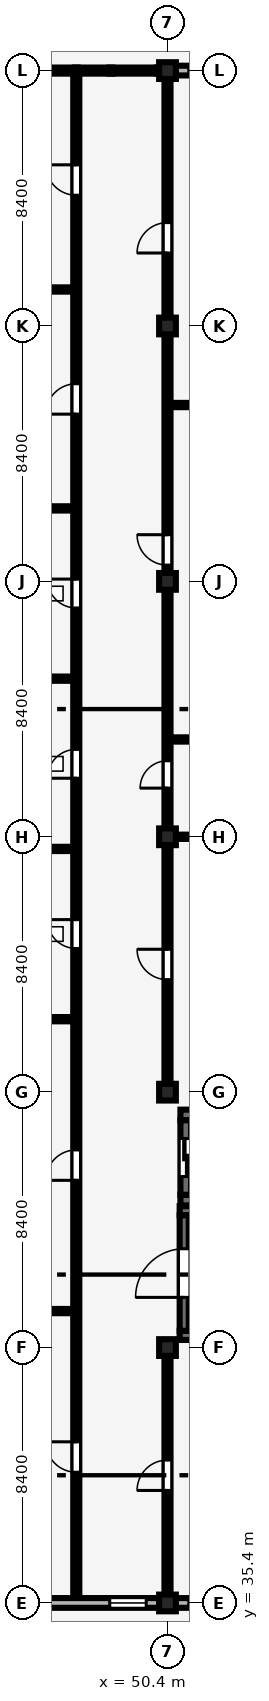
"""IFC4 building model, lengths in metres.
Left out: names, types, materials, properties, quantities, classifications, styles, units other than length and angle.
Written with IfcOpenShell. Run it as: python <this file> out.ifc"""

import sys

from ifc_helpers import new_model, si_unit, direction, frame, frame_2d, origin, origin_2d, place, context, subcontext, project, spatial, rectangle, extrude, element, fill, save


model = new_model("IFC4")
c1 = context("Model", 3, precision=1e-05, world=origin(), true_north=direction((0.0, 1.0)))
c2 = subcontext(c1, "Body", "Model", "MODEL_VIEW")
j1 = project(units=[si_unit("LENGTHUNIT", "METRE"), si_unit("PLANEANGLEUNIT", "RADIAN")], contexts=[c1])
p1 = place(None, origin())
s1 = spatial("IfcSite", under=j1, at=p1, CompositionType="ELEMENT")
p2 = place(p1, origin())
s2 = spatial("IfcBuilding", under=s1, at=p2, CompositionType="ELEMENT")
p3 = place(p2, frame((0.0, 0.0, 9.0)))
s3 = spatial("IfcBuildingStorey", under=s2, at=p3, CompositionType="ELEMENT", Elevation=9.0)
for number, where, z_axis, x_axis in (
    (1, (50.4, 35.4, 0.0), (0.0, 0.0, 1.0), (1.0, 0.0, 0.0)),
    (2, (50.4, 43.8, 0.0), (0.0, 0.0, 1.0), (1.0, 0.0, 0.0)),
    (3, (50.4, 52.2, 0.0), (0.0, 0.0, 1.0), (1.0, 0.0, 0.0)),
    (4, (50.4, 60.6, 0.0), (0.0, 0.0, 1.0), (1.0, 0.0, 0.0)),
    (5, (50.4, 69.0, 0.0), (0.0, 0.0, 1.0), (1.0, 0.0, 0.0)),
    (6, (50.4, 77.4, 0.0), (0.0, 0.0, 1.0), (1.0, 0.0, 0.0)),
    (7, (50.4, 85.8, 0.0), (0.0, 0.0, 1.0), (1.0, 0.0, 0.0)),
):
    element("IfcColumn", number, at=place(p3, frame(where, z_axis=z_axis, x_axis=x_axis)), inside=s3, PredefinedType="COLUMN", context=c2, shape_type="SweptSolid", body=[
        extrude(rectangle(XDim=0.55, YDim=0.55, at=origin_2d()), origin(), (0.0, 0.0, 1.0), 4.2),
    ])
p4 = place(p3, frame((42.25, 35.4, 0.0), z_axis=(0.0, 0.0, 1.0), x_axis=(1.0, 0.0, 0.0)))
e8 = element("IfcWall", 8, at=p4, inside=s3, PredefinedType="SOLIDWALL", context=c2, shape_type="SweptSolid", body=[
    extrude(rectangle(XDim=7.9, YDim=0.32, at=frame_2d((3.95, 0.0))), origin(), (0.0, 0.0, 1.0), 2.96),
])
p5 = place(p4, frame((0.45, 0.0, 0.9)))
e9 = element("IfcOpeningElement", 9, at=p5, cuts=e8, PredefinedType="OPENING", context=c2, shape_type="SweptSolid", body=[
    extrude(rectangle(XDim=1.2, YDim=1.5, at=frame_2d((0.6, 0.75))), frame((0.0, 0.17, 0.0), z_axis=(0.0, -1.0, 0.0), x_axis=(1.0, 0.0, 0.0)), (0.0, 0.0, 1.0), 0.34),
])
p6 = place(p4, frame((6.25, 0.0, 0.9)))
e10 = element("IfcOpeningElement", 10, at=p6, cuts=e8, PredefinedType="OPENING", context=c2, shape_type="SweptSolid", body=[
    extrude(rectangle(XDim=1.2, YDim=1.8, at=frame_2d((0.6, 0.9))), frame((0.0, 0.17, 0.0), z_axis=(0.0, -1.0, 0.0), x_axis=(1.0, 0.0, 0.0)), (0.0, 0.0, 1.0), 0.34),
])
p7 = place(p3, frame((50.65, 35.4, 0.0), z_axis=(0.0, 0.0, 1.0), x_axis=(1.0, 0.0, 0.0)))
e11 = element("IfcWall", 11, at=p7, inside=s3, PredefinedType="SOLIDWALL", context=c2, shape_type="SweptSolid", body=[
    extrude(rectangle(XDim=7.9, YDim=0.32, at=frame_2d((3.95, 0.0))), origin(), (0.0, 0.0, 1.0), 2.91),
])
p8 = place(p7, frame((4.75, 0.0, 0.0), z_axis=(0.0, 0.0, 1.0), x_axis=(-1.0, 0.0, 0.0)))
e12 = element("IfcOpeningElement", 12, at=p8, cuts=e11, PredefinedType="OPENING", context=c2, shape_type="SweptSolid", body=[
    extrude(rectangle(XDim=1.6, YDim=2.3, at=frame_2d((0.8, 1.15))), frame((0.0, 0.17, 0.0), z_axis=(0.0, -1.0, 0.0), x_axis=(1.0, 0.0, 0.0)), (0.0, 0.0, 1.0), 0.34),
])
p9 = place(p7, frame((0.45, 0.0, 0.95)))
e13 = element("IfcOpeningElement", 13, at=p9, cuts=e11, PredefinedType="OPENING", context=c2, shape_type="SweptSolid", body=[
    extrude(rectangle(XDim=1.68, YDim=1.8, at=frame_2d((0.84, 0.9))), frame((0.0, 0.17, 0.0), z_axis=(0.0, -1.0, 0.0), x_axis=(1.0, 0.0, 0.0)), (0.0, 0.0, 1.0), 0.34),
])
p10 = place(p3, frame((50.65, 85.8, 0.0), z_axis=(0.0, 0.0, 1.0), x_axis=(1.0, 0.0, 0.0)))
e14 = element("IfcWall", 14, at=p10, inside=s3, PredefinedType="SOLIDWALL", context=c2, shape_type="SweptSolid", body=[
    extrude(rectangle(XDim=7.9, YDim=0.32, at=frame_2d((3.95, 0.0))), origin(), (0.0, 0.0, 1.0), 3.01),
])
p11 = place(p10, frame((0.45, 0.0, 0.9)))
e15 = element("IfcOpeningElement", 15, at=p11, cuts=e14, PredefinedType="OPENING", context=c2, shape_type="SweptSolid", body=[
    extrude(rectangle(XDim=1.68, YDim=1.96, at=frame_2d((0.84, 0.98))), frame((0.0, 0.17, 0.0), z_axis=(0.0, -1.0, 0.0), x_axis=(1.0, 0.0, 0.0)), (0.0, 0.0, 1.0), 0.34),
])
p12 = place(p10, frame((6.25, 0.0, 0.9)))
e16 = element("IfcOpeningElement", 16, at=p12, cuts=e14, PredefinedType="OPENING", context=c2, shape_type="SweptSolid", body=[
    extrude(rectangle(XDim=1.2, YDim=1.5, at=frame_2d((0.6, 0.75))), frame((0.0, 0.17, 0.0), z_axis=(0.0, -1.0, 0.0), x_axis=(1.0, 0.0, 0.0)), (0.0, 0.0, 1.0), 0.34),
])
for number, where, z_axis, x_axis in (
    (17, (50.8, 44.2, 0.0), (0.0, 0.0, 1.0), (1.0, 0.0, 0.0)),
    (18, (50.8, 48.3, 0.0), (0.0, 0.0, 1.0), (1.0, 0.0, 0.0)),
):
    element("IfcWall", number, at=place(p3, frame(where, z_axis=z_axis, x_axis=x_axis)), inside=s3, PredefinedType="SHEAR", context=c2, shape_type="SweptSolid", body=[
        extrude(rectangle(XDim=7.6, YDim=0.3, at=frame_2d((3.8, 0.0))), origin(), (0.0, 0.0, 1.0), 4.025),
    ])
p13 = place(p3, frame((50.95, 44.35, 0.0), z_axis=(0.0, 0.0, 1.0), x_axis=(0.0, 1.0, 0.0)))
e19 = element("IfcWall", 19, at=p13, inside=s3, PredefinedType="SHEAR", context=c2, shape_type="SweptSolid", body=[
    extrude(rectangle(XDim=3.8, YDim=0.3, at=frame_2d((1.9, 0.0))), origin(), (0.0, 0.0, 1.0), 4.025),
])
p14 = place(p13, frame((1.1, 0.0, 0.0)))
e20 = element("IfcOpeningElement", 20, at=p14, cuts=e19, PredefinedType="OPENING", context=c2, shape_type="SweptSolid", body=[
    extrude(rectangle(XDim=1.6, YDim=2.2, at=frame_2d((0.8, 1.1))), frame((0.0, 0.16, 0.0), z_axis=(0.0, -1.0, 0.0), x_axis=(1.0, 0.0, 0.0)), (0.0, 0.0, 1.0), 0.32),
])
for number, where, z_axis, x_axis in (
    (21, (50.825, 48.65, 0.0), (0.0, 0.0, 1.0), (1.0, 0.0, 0.0)),
    (22, (50.825, 51.45, 0.0), (0.0, 0.0, 1.0), (1.0, 0.0, 0.0)),
):
    element("IfcWall", number, at=place(p3, frame(where, z_axis=z_axis, x_axis=x_axis)), inside=s3, PredefinedType="SHEAR", context=c2, shape_type="SweptSolid", body=[
        extrude(rectangle(XDim=3.55, YDim=0.35, at=frame_2d((1.775, 0.0))), origin(), (0.0, 0.0, 1.0), 3.92),
    ])
p15 = place(p3, frame((51.0, 48.825, 0.0), z_axis=(0.0, 0.0, 1.0), x_axis=(0.0, 1.0, 0.0)))
e23 = element("IfcWall", 23, at=p15, inside=s3, PredefinedType="SHEAR", context=c2, shape_type="SweptSolid", body=[
    extrude(rectangle(XDim=2.45, YDim=0.35, at=frame_2d((1.225, 0.0))), origin(), (0.0, 0.0, 1.0), 3.92),
])
p16 = place(p15, frame((0.6, 0.0, 0.0)))
e24 = element("IfcOpeningElement", 24, at=p16, cuts=e23, PredefinedType="OPENING", context=c2, shape_type="SweptSolid", body=[
    extrude(rectangle(XDim=1.25, YDim=2.25, at=frame_2d((0.625, 1.125))), frame((0.0, 0.185, 0.0), z_axis=(0.0, -1.0, 0.0), x_axis=(1.0, 0.0, 0.0)), (0.0, 0.0, 1.0), 0.37),
])
p17 = place(p3, frame((42.105, 45.0, 0.0), z_axis=(0.0, 0.0, 1.0), x_axis=(1.0, 0.0, 0.0)))
e25 = element("IfcWall", 25, at=p17, inside=s3, PredefinedType="PARTITIONING", context=c2, shape_type="SweptSolid", body=[
    extrude(rectangle(XDim=5.19, YDim=0.14, at=frame_2d((2.595, 0.0))), origin(), (0.0, 0.0, 1.0), 3.9),
])
p18 = place(p3, frame((42.165, 54.6, 0.0), z_axis=(0.0, 0.0, 1.0), x_axis=(1.0, 0.0, 0.0)))
e26 = element("IfcWall", 26, at=p18, inside=s3, PredefinedType="PARTITIONING", context=c2, shape_type="SweptSolid", body=[
    extrude(rectangle(XDim=5.13, YDim=0.14, at=frame_2d((2.565, 0.0))), origin(), (0.0, 0.0, 1.0), 3.51),
])
p19 = place(p3, frame((42.165, 60.2, 0.0), z_axis=(0.0, 0.0, 1.0), x_axis=(1.0, 0.0, 0.0)))
e27 = element("IfcWall", 27, at=p19, inside=s3, PredefinedType="PARTITIONING", context=c2, shape_type="SweptSolid", body=[
    extrude(rectangle(XDim=5.13, YDim=0.14, at=frame_2d((2.565, 0.0))), origin(), (0.0, 0.0, 1.0), 2.96),
])
p20 = place(p3, frame((42.195, 65.8, 0.0), z_axis=(0.0, 0.0, 1.0), x_axis=(1.0, 0.0, 0.0)))
e28 = element("IfcWall", 28, at=p20, inside=s3, PredefinedType="PARTITIONING", context=c2, shape_type="SweptSolid", body=[
    extrude(rectangle(XDim=5.1, YDim=0.14, at=frame_2d((2.55, 0.0))), origin(), (0.0, 0.0, 1.0), 3.9),
])
p21 = place(p3, frame((42.195, 71.4, 0.0), z_axis=(0.0, 0.0, 1.0), x_axis=(1.0, 0.0, 0.0)))
e29 = element("IfcWall", 29, at=p21, inside=s3, PredefinedType="PARTITIONING", context=c2, shape_type="SweptSolid", body=[
    extrude(rectangle(XDim=5.1, YDim=0.14, at=frame_2d((2.55, 0.0))), origin(), (0.0, 0.0, 1.0), 3.51),
])
p22 = place(p3, frame((42.195, 78.6, 0.0), z_axis=(0.0, 0.0, 1.0), x_axis=(1.0, 0.0, 0.0)))
e30 = element("IfcWall", 30, at=p22, inside=s3, PredefinedType="PARTITIONING", context=c2, shape_type="SweptSolid", body=[
    extrude(rectangle(XDim=5.1, YDim=0.14, at=frame_2d((2.55, 0.0))), origin(), (0.0, 0.0, 1.0), 3.9),
])
p23 = place(p3, frame((47.4, 35.565, 0.0), z_axis=(0.0, 0.0, 1.0), x_axis=(0.0, 1.0, 0.0)))
e31 = element("IfcWall", 31, at=p23, inside=s3, PredefinedType="PARTITIONING", context=c2, shape_type="SweptSolid", body=[
    extrude(rectangle(XDim=50.13, YDim=0.2, at=frame_2d((25.065, 0.0))), origin(), (0.0, 0.0, 1.0), 3.9),
])
p24 = place(p23, frame((4.135, 0.0, 0.0)))
e32 = element("IfcOpeningElement", 32, at=p24, cuts=e31, PredefinedType="OPENING", context=c2, shape_type="SweptSolid", body=[
    extrude(rectangle(XDim=1.0, YDim=2.15, at=frame_2d((0.5, 1.075))), frame((0.0, 0.11, 0.0), z_axis=(0.0, -1.0, 0.0), x_axis=(1.0, 0.0, 0.0)), (0.0, 0.0, 1.0), 0.22),
])
p25 = place(p23, frame((13.735, 0.0, 0.0)))
e33 = element("IfcOpeningElement", 33, at=p25, cuts=e31, PredefinedType="OPENING", context=c2, shape_type="SweptSolid", body=[
    extrude(rectangle(XDim=1.0, YDim=2.15, at=frame_2d((0.5, 1.075))), frame((0.0, 0.11, 0.0), z_axis=(0.0, -1.0, 0.0), x_axis=(1.0, 0.0, 0.0)), (0.0, 0.0, 1.0), 0.22),
])
p26 = place(p23, frame((21.36, 0.0, 0.0)))
e34 = element("IfcOpeningElement", 34, at=p26, cuts=e31, PredefinedType="OPENING", context=c2, shape_type="SweptSolid", body=[
    extrude(rectangle(XDim=0.95, YDim=2.2, at=frame_2d((0.475, 1.1))), frame((0.0, 0.11, 0.0), z_axis=(0.0, -1.0, 0.0), x_axis=(1.0, 0.0, 0.0)), (0.0, 0.0, 1.0), 0.22),
])
p27 = place(p23, frame((26.96, 0.0, 0.0)))
e35 = element("IfcOpeningElement", 35, at=p27, cuts=e31, PredefinedType="OPENING", context=c2, shape_type="SweptSolid", body=[
    extrude(rectangle(XDim=0.95, YDim=2.2, at=frame_2d((0.475, 1.1))), frame((0.0, 0.11, 0.0), z_axis=(0.0, -1.0, 0.0), x_axis=(1.0, 0.0, 0.0)), (0.0, 0.0, 1.0), 0.22),
])
p28 = place(p23, frame((32.56, 0.0, 0.0)))
e36 = element("IfcOpeningElement", 36, at=p28, cuts=e31, PredefinedType="OPENING", context=c2, shape_type="SweptSolid", body=[
    extrude(rectangle(XDim=0.95, YDim=2.1, at=frame_2d((0.475, 1.05))), frame((0.0, 0.11, 0.0), z_axis=(0.0, -1.0, 0.0), x_axis=(1.0, 0.0, 0.0)), (0.0, 0.0, 1.0), 0.22),
])
p29 = place(p23, frame((38.935, 0.0, 0.0)))
e37 = element("IfcOpeningElement", 37, at=p29, cuts=e31, PredefinedType="OPENING", context=c2, shape_type="SweptSolid", body=[
    extrude(rectangle(XDim=1.0, YDim=2.15, at=frame_2d((0.5, 1.075))), frame((0.0, 0.11, 0.0), z_axis=(0.0, -1.0, 0.0), x_axis=(1.0, 0.0, 0.0)), (0.0, 0.0, 1.0), 0.22),
])
p30 = place(p23, frame((46.135, 0.0, 0.0)))
e38 = element("IfcOpeningElement", 38, at=p30, cuts=e31, PredefinedType="OPENING", context=c2, shape_type="SweptSolid", body=[
    extrude(rectangle(XDim=1.0, YDim=2.15, at=frame_2d((0.5, 1.075))), frame((0.0, 0.11, 0.0), z_axis=(0.0, -1.0, 0.0), x_axis=(1.0, 0.0, 0.0)), (0.0, 0.0, 1.0), 0.22),
])
p31 = place(p3, frame((50.4, 35.565, 0.0), z_axis=(0.0, 0.0, 1.0), x_axis=(0.0, 1.0, 0.0)))
e39 = element("IfcWall", 39, at=p31, inside=s3, PredefinedType="PARTITIONING", context=c2, shape_type="SweptSolid", body=[
    extrude(rectangle(XDim=7.95, YDim=0.2, at=frame_2d((3.975, 0.0))), origin(), (0.0, 0.0, 1.0), 3.26),
])
p32 = place(p31, frame((3.535, 0.0, 0.0)))
e40 = element("IfcOpeningElement", 40, at=p32, cuts=e39, PredefinedType="OPENING", context=c2, shape_type="SweptSolid", body=[
    extrude(rectangle(XDim=1.0, YDim=2.15, at=frame_2d((0.5, 1.075))), frame((0.0, 0.11, 0.0), z_axis=(0.0, -1.0, 0.0), x_axis=(1.0, 0.0, 0.0)), (0.0, 0.0, 1.0), 0.22),
])
p33 = place(p3, frame((50.505, 60.6, 0.0), z_axis=(0.0, 0.0, 1.0), x_axis=(1.0, 0.0, 0.0)))
e41 = element("IfcWall", 41, at=p33, inside=s3, PredefinedType="PARTITIONING", context=c2, shape_type="SweptSolid", body=[
    extrude(rectangle(XDim=8.01, YDim=0.14, at=frame_2d((4.005, 0.0))), origin(), (0.0, 0.0, 1.0), 2.91),
])
for number, where, z_axis, x_axis in (
    (42, (50.505, 63.8, 0.0), (0.0, 0.0, 1.0), (1.0, 0.0, 0.0)),
    (43, (50.505, 74.8, 0.0), (0.0, 0.0, 1.0), (1.0, 0.0, 0.0)),
):
    element("IfcWall", number, at=place(p3, frame(where, z_axis=z_axis, x_axis=x_axis)), inside=s3, PredefinedType="PARTITIONING", context=c2, shape_type="SweptSolid", body=[
        extrude(rectangle(XDim=16.57, YDim=0.14, at=frame_2d((8.285, 0.0))), origin(), (0.0, 0.0, 1.0), 3.51),
    ])
p34 = place(p3, frame((50.4, 52.485, 0.0), z_axis=(0.0, 0.0, 1.0), x_axis=(0.0, 1.0, 0.0)))
e44 = element("IfcWall", 44, at=p34, inside=s3, PredefinedType="PARTITIONING", context=c2, shape_type="SweptSolid", body=[
    extrude(rectangle(XDim=7.83, YDim=0.2, at=frame_2d((3.915, 0.0))), origin(), (0.0, 0.0, 1.0), 3.26),
])
p35 = place(p34, frame((3.415, 0.0, 0.0)))
e45 = element("IfcOpeningElement", 45, at=p35, cuts=e44, PredefinedType="OPENING", context=c2, shape_type="SweptSolid", body=[
    extrude(rectangle(XDim=1.0, YDim=2.15, at=frame_2d((0.5, 1.075))), frame((0.0, 0.11, 0.0), z_axis=(0.0, -1.0, 0.0), x_axis=(1.0, 0.0, 0.0)), (0.0, 0.0, 1.0), 0.22),
])
p36 = place(p3, frame((50.4, 60.885, 0.0), z_axis=(0.0, 0.0, 1.0), x_axis=(0.0, 1.0, 0.0)))
e46 = element("IfcWall", 46, at=p36, inside=s3, PredefinedType="PARTITIONING", context=c2, shape_type="SweptSolid", body=[
    extrude(rectangle(XDim=7.83, YDim=0.2, at=frame_2d((3.915, 0.0))), origin(), (0.0, 0.0, 1.0), 3.21),
])
p37 = place(p36, frame((1.315, 0.0, 0.0)))
e47 = element("IfcOpeningElement", 47, at=p37, cuts=e46, PredefinedType="OPENING", context=c2, shape_type="SweptSolid", body=[
    extrude(rectangle(XDim=0.9, YDim=2.1, at=frame_2d((0.45, 1.05))), frame((0.0, 0.11, 0.0), z_axis=(0.0, -1.0, 0.0), x_axis=(1.0, 0.0, 0.0)), (0.0, 0.0, 1.0), 0.22),
])
p38 = place(p3, frame((50.4, 69.285, 0.0), z_axis=(0.0, 0.0, 1.0), x_axis=(0.0, 1.0, 0.0)))
e48 = element("IfcWall", 48, at=p38, inside=s3, PredefinedType="PARTITIONING", context=c2, shape_type="SweptSolid", body=[
    extrude(rectangle(XDim=7.83, YDim=0.2, at=frame_2d((3.915, 0.0))), origin(), (0.0, 0.0, 1.0), 3.16),
])
p39 = place(p38, frame((0.25, 0.0, 0.0)))
e49 = element("IfcOpeningElement", 49, at=p39, cuts=e48, PredefinedType="OPENING", context=c2, shape_type="SweptSolid", body=[
    extrude(rectangle(XDim=1.0, YDim=2.15, at=frame_2d((0.5, 1.075))), frame((0.0, 0.11, 0.0), z_axis=(0.0, -1.0, 0.0), x_axis=(1.0, 0.0, 0.0)), (0.0, 0.0, 1.0), 0.22),
])
p40 = place(p3, frame((50.4, 77.685, 0.0), z_axis=(0.0, 0.0, 1.0), x_axis=(0.0, 1.0, 0.0)))
e50 = element("IfcWall", 50, at=p40, inside=s3, PredefinedType="PARTITIONING", context=c2, shape_type="SweptSolid", body=[
    extrude(rectangle(XDim=8.01, YDim=0.2, at=frame_2d((4.005, 0.0))), origin(), (0.0, 0.0, 1.0), 3.21),
])
p41 = place(p40, frame((2.115, 0.0, 0.0)))
e51 = element("IfcOpeningElement", 51, at=p41, cuts=e50, PredefinedType="OPENING", context=c2, shape_type="SweptSolid", body=[
    extrude(rectangle(XDim=1.0, YDim=2.15, at=frame_2d((0.5, 1.075))), frame((0.0, 0.11, 0.0), z_axis=(0.0, -1.0, 0.0), x_axis=(1.0, 0.0, 0.0)), (0.0, 0.0, 1.0), 0.22),
])
p42 = place(p6, origin())
e52 = element("IfcWindow", 52, at=p42, inside=s3, PartitioningType="SINGLE_PANEL", PredefinedType="WINDOW", context=c2, shape_type="SweptSolid", body=[
    extrude(rectangle(XDim=1.2, YDim=1.8, at=frame_2d((0.6, 0.9))), frame((0.0, 0.03, 0.0), z_axis=(0.0, -1.0, 0.0), x_axis=(1.0, 0.0, 0.0)), (0.0, 0.0, 1.0), 0.06),
])
fill(e10, e52)
p43 = place(p9, origin())
e53 = element("IfcWindow", 53, at=p43, inside=s3, PartitioningType="SINGLE_PANEL", PredefinedType="WINDOW", context=c2, shape_type="SweptSolid", body=[
    extrude(rectangle(XDim=1.68, YDim=1.8, at=frame_2d((0.84, 0.9))), frame((0.0, 0.03, 0.0), z_axis=(0.0, -1.0, 0.0), x_axis=(1.0, 0.0, 0.0)), (0.0, 0.0, 1.0), 0.06),
])
fill(e13, e53)
p44 = place(p11, origin())
e54 = element("IfcWindow", 54, at=p44, inside=s3, PartitioningType="SINGLE_PANEL", PredefinedType="WINDOW", context=c2, shape_type="SweptSolid", body=[
    extrude(rectangle(XDim=1.68, YDim=1.96, at=frame_2d((0.84, 0.98))), frame((0.0, 0.03, 0.0), z_axis=(0.0, -1.0, 0.0), x_axis=(1.0, 0.0, 0.0)), (0.0, 0.0, 1.0), 0.06),
])
fill(e15, e54)
p45 = place(p14, origin())
e55 = element("IfcDoor", 55, at=p45, inside=s3, OperationType="DOUBLE_DOOR_SINGLE_SWING", PredefinedType="DOOR", context=c2, shape_type="SweptSolid", body=[
    extrude(rectangle(XDim=1.6, YDim=2.2, at=frame_2d((0.8, 1.1))), frame((0.0, 0.025, 0.0), z_axis=(0.0, -1.0, 0.0), x_axis=(1.0, 0.0, 0.0)), (0.0, 0.0, 1.0), 0.05),
])
fill(e20, e55)
p46 = place(p16, origin())
e56 = element("IfcDoor", 56, at=p46, inside=s3, OperationType="DOUBLE_DOOR_SLIDING", PredefinedType="DOOR", context=c2, shape_type="SweptSolid", body=[
    extrude(rectangle(XDim=1.25, YDim=2.25, at=frame_2d((0.625, 1.125))), frame((0.0, 0.025, 0.0), z_axis=(0.0, -1.0, 0.0), x_axis=(1.0, 0.0, 0.0)), (0.0, 0.0, 1.0), 0.05),
])
fill(e24, e56)
p47 = place(p24, origin())
e57 = element("IfcDoor", 57, at=p47, inside=s3, OperationType="SINGLE_SWING_RIGHT", PredefinedType="DOOR", context=c2, shape_type="SweptSolid", body=[
    extrude(rectangle(XDim=1.0, YDim=2.15, at=frame_2d((0.5, 1.075))), frame((0.0, 0.025, 0.0), z_axis=(0.0, -1.0, 0.0), x_axis=(1.0, 0.0, 0.0)), (0.0, 0.0, 1.0), 0.05),
])
fill(e32, e57)
p48 = place(p25, origin())
e58 = element("IfcDoor", 58, at=p48, inside=s3, OperationType="SINGLE_SWING_LEFT", PredefinedType="DOOR", context=c2, shape_type="SweptSolid", body=[
    extrude(rectangle(XDim=1.0, YDim=2.15, at=frame_2d((0.5, 1.075))), frame((0.0, 0.025, 0.0), z_axis=(0.0, -1.0, 0.0), x_axis=(1.0, 0.0, 0.0)), (0.0, 0.0, 1.0), 0.05),
])
fill(e33, e58)
p49 = place(p26, origin())
e59 = element("IfcDoor", 59, at=p49, inside=s3, OperationType="SINGLE_SWING_RIGHT", PredefinedType="DOOR", context=c2, shape_type="SweptSolid", body=[
    extrude(rectangle(XDim=0.95, YDim=2.2, at=frame_2d((0.475, 1.1))), frame((0.0, 0.025, 0.0), z_axis=(0.0, -1.0, 0.0), x_axis=(1.0, 0.0, 0.0)), (0.0, 0.0, 1.0), 0.05),
])
fill(e34, e59)
p50 = place(p27, origin())
e60 = element("IfcDoor", 60, at=p50, inside=s3, OperationType="SINGLE_SWING_LEFT", PredefinedType="DOOR", context=c2, shape_type="SweptSolid", body=[
    extrude(rectangle(XDim=0.95, YDim=2.2, at=frame_2d((0.475, 1.1))), frame((0.0, 0.025, 0.0), z_axis=(0.0, -1.0, 0.0), x_axis=(1.0, 0.0, 0.0)), (0.0, 0.0, 1.0), 0.05),
])
fill(e35, e60)
p51 = place(p28, origin())
e61 = element("IfcDoor", 61, at=p51, inside=s3, OperationType="SINGLE_SWING_RIGHT", PredefinedType="DOOR", context=c2, shape_type="SweptSolid", body=[
    extrude(rectangle(XDim=0.95, YDim=2.1, at=frame_2d((0.475, 1.05))), frame((0.0, 0.025, 0.0), z_axis=(0.0, -1.0, 0.0), x_axis=(1.0, 0.0, 0.0)), (0.0, 0.0, 1.0), 0.05),
])
fill(e36, e61)
p52 = place(p29, origin())
e62 = element("IfcDoor", 62, at=p52, inside=s3, OperationType="SINGLE_SWING_LEFT", PredefinedType="DOOR", context=c2, shape_type="SweptSolid", body=[
    extrude(rectangle(XDim=1.0, YDim=2.15, at=frame_2d((0.5, 1.075))), frame((0.0, 0.025, 0.0), z_axis=(0.0, -1.0, 0.0), x_axis=(1.0, 0.0, 0.0)), (0.0, 0.0, 1.0), 0.05),
])
fill(e37, e62)
p53 = place(p30, origin())
e63 = element("IfcDoor", 63, at=p53, inside=s3, OperationType="SINGLE_SWING_RIGHT", PredefinedType="DOOR", context=c2, shape_type="SweptSolid", body=[
    extrude(rectangle(XDim=1.0, YDim=2.15, at=frame_2d((0.5, 1.075))), frame((0.0, 0.025, 0.0), z_axis=(0.0, -1.0, 0.0), x_axis=(1.0, 0.0, 0.0)), (0.0, 0.0, 1.0), 0.05),
])
fill(e38, e63)
p54 = place(p32, origin())
e64 = element("IfcDoor", 64, at=p54, inside=s3, OperationType="SINGLE_SWING_LEFT", PredefinedType="DOOR", context=c2, shape_type="SweptSolid", body=[
    extrude(rectangle(XDim=1.0, YDim=2.15, at=frame_2d((0.5, 1.075))), frame((0.0, 0.025, 0.0), z_axis=(0.0, -1.0, 0.0), x_axis=(1.0, 0.0, 0.0)), (0.0, 0.0, 1.0), 0.05),
])
fill(e40, e64)
p55 = place(p35, origin())
e65 = element("IfcDoor", 65, at=p55, inside=s3, OperationType="SINGLE_SWING_RIGHT", PredefinedType="DOOR", context=c2, shape_type="SweptSolid", body=[
    extrude(rectangle(XDim=1.0, YDim=2.15, at=frame_2d((0.5, 1.075))), frame((0.0, 0.025, 0.0), z_axis=(0.0, -1.0, 0.0), x_axis=(1.0, 0.0, 0.0)), (0.0, 0.0, 1.0), 0.05),
])
fill(e45, e65)
p56 = place(p37, origin())
e66 = element("IfcDoor", 66, at=p56, inside=s3, OperationType="SINGLE_SWING_LEFT", PredefinedType="DOOR", context=c2, shape_type="SweptSolid", body=[
    extrude(rectangle(XDim=0.9, YDim=2.1, at=frame_2d((0.45, 1.05))), frame((0.0, 0.025, 0.0), z_axis=(0.0, -1.0, 0.0), x_axis=(1.0, 0.0, 0.0)), (0.0, 0.0, 1.0), 0.05),
])
fill(e47, e66)
p57 = place(p39, origin())
e67 = element("IfcDoor", 67, at=p57, inside=s3, OperationType="SINGLE_SWING_RIGHT", PredefinedType="DOOR", context=c2, shape_type="SweptSolid", body=[
    extrude(rectangle(XDim=1.0, YDim=2.15, at=frame_2d((0.5, 1.075))), frame((0.0, 0.025, 0.0), z_axis=(0.0, -1.0, 0.0), x_axis=(1.0, 0.0, 0.0)), (0.0, 0.0, 1.0), 0.05),
])
fill(e49, e67)
p58 = place(p41, origin())
e68 = element("IfcDoor", 68, at=p58, inside=s3, OperationType="SINGLE_SWING_LEFT", PredefinedType="DOOR", context=c2, shape_type="SweptSolid", body=[
    extrude(rectangle(XDim=1.0, YDim=2.15, at=frame_2d((0.5, 1.075))), frame((0.0, 0.025, 0.0), z_axis=(0.0, -1.0, 0.0), x_axis=(1.0, 0.0, 0.0)), (0.0, 0.0, 1.0), 0.05),
])
fill(e51, e68)
save(model, sys.argv[1])
